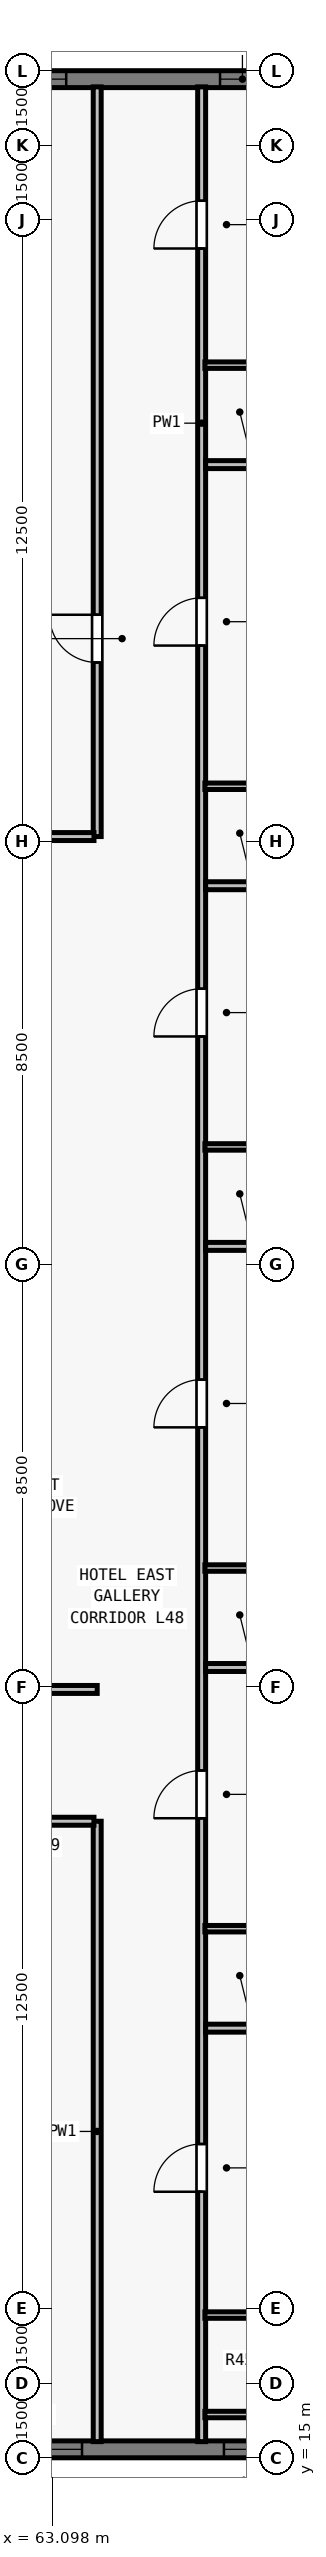
"""IFC4 building model, lengths in metres.
Left out: names, types, materials, properties, quantities, classifications, styles, units other than length and angle.
Written with IfcOpenShell. Run it as: python <this file> out.ifc"""

import sys

from ifc_helpers import new_model, si_unit, direction, frame, frame_2d, origin, place, context, subcontext, project, spatial, rectangle, extrude, element, fill, save


model = new_model("IFC4")
c1 = context("Model", 3, precision=1e-05, world=origin(), true_north=direction((0.0, 1.0)))
c2 = subcontext(c1, "Body", "Model", "MODEL_VIEW")
j1 = project(units=[si_unit("LENGTHUNIT", "METRE"), si_unit("PLANEANGLEUNIT", "RADIAN")], contexts=[c1])
p1 = place(None, origin())
s1 = spatial("IfcSite", under=j1, at=p1, CompositionType="ELEMENT")
p2 = place(p1, origin())
s2 = spatial("IfcBuilding", under=s1, at=p2, CompositionType="ELEMENT")
p3 = place(p2, frame((0.0, 0.0, 176.0)))
s3 = spatial("IfcBuildingStorey", under=s2, at=p3, CompositionType="ELEMENT", Elevation=176.0)
p4 = place(p3, frame((72.0, 15.17, 0.0), z_axis=(0.0, 0.0, 1.0), x_axis=(-1.0, 0.0, 0.0)))
e1 = element("IfcWall", 1, at=p4, inside=s3, PredefinedType="SOLIDWALL", context=c2, shape_type="SweptSolid", body=[
    extrude(rectangle(XDim=39.682, YDim=0.34, at=frame_2d((19.841, 0.0))), origin(), (0.0, 0.0, 1.0), 3.28),
])
p5 = place(p4, frame((4.102, 0.0, 0.8)))
e2 = element("IfcOpeningElement", 2, at=p5, cuts=e1, PredefinedType="OPENING", context=c2, shape_type="SweptSolid", body=[
    extrude(rectangle(XDim=1.35, YDim=1.66, at=frame_2d((0.675, 0.83))), frame((0.0, 0.18, 0.0), z_axis=(0.0, -1.0, 0.0), x_axis=(1.0, 0.0, 0.0)), (0.0, 0.0, 1.0), 0.36),
])
p6 = place(p4, frame((8.305, 0.0, 0.8)))
e3 = element("IfcOpeningElement", 3, at=p6, cuts=e1, PredefinedType="OPENING", context=c2, shape_type="SweptSolid", body=[
    extrude(rectangle(XDim=1.75, YDim=1.66, at=frame_2d((0.875, 0.83))), frame((0.0, 0.18, 0.0), z_axis=(0.0, -1.0, 0.0), x_axis=(1.0, 0.0, 0.0)), (0.0, 0.0, 1.0), 0.36),
])
p7 = place(p4, frame((12.059, 0.0, 0.8)))
e4 = element("IfcOpeningElement", 4, at=p7, cuts=e1, PredefinedType="OPENING", context=c2, shape_type="SweptSolid", body=[
    extrude(rectangle(XDim=1.35, YDim=1.66, at=frame_2d((0.675, 0.83))), frame((0.0, 0.18, 0.0), z_axis=(0.0, -1.0, 0.0), x_axis=(1.0, 0.0, 0.0)), (0.0, 0.0, 1.0), 0.36),
])
p8 = place(p4, frame((16.262, 0.0, 0.8)))
e5 = element("IfcOpeningElement", 5, at=p8, cuts=e1, PredefinedType="OPENING", context=c2, shape_type="SweptSolid", body=[
    extrude(rectangle(XDim=1.75, YDim=1.66, at=frame_2d((0.875, 0.83))), frame((0.0, 0.18, 0.0), z_axis=(0.0, -1.0, 0.0), x_axis=(1.0, 0.0, 0.0)), (0.0, 0.0, 1.0), 0.36),
])
p9 = place(p4, frame((19.166, 0.0, 0.8)))
e6 = element("IfcOpeningElement", 6, at=p9, cuts=e1, PredefinedType="OPENING", context=c2, shape_type="SweptSolid", body=[
    extrude(rectangle(XDim=1.35, YDim=1.66, at=frame_2d((0.675, 0.83))), frame((0.0, 0.18, 0.0), z_axis=(0.0, -1.0, 0.0), x_axis=(1.0, 0.0, 0.0)), (0.0, 0.0, 1.0), 0.36),
])
p10 = place(p4, frame((21.27, 0.0, 0.8)))
e7 = element("IfcOpeningElement", 7, at=p10, cuts=e1, PredefinedType="OPENING", context=c2, shape_type="SweptSolid", body=[
    extrude(rectangle(XDim=1.75, YDim=1.66, at=frame_2d((0.875, 0.83))), frame((0.0, 0.18, 0.0), z_axis=(0.0, -1.0, 0.0), x_axis=(1.0, 0.0, 0.0)), (0.0, 0.0, 1.0), 0.36),
])
p11 = place(p4, frame((26.273, 0.0, 0.8)))
e8 = element("IfcOpeningElement", 8, at=p11, cuts=e1, PredefinedType="OPENING", context=c2, shape_type="SweptSolid", body=[
    extrude(rectangle(XDim=1.35, YDim=1.66, at=frame_2d((0.675, 0.83))), frame((0.0, 0.18, 0.0), z_axis=(0.0, -1.0, 0.0), x_axis=(1.0, 0.0, 0.0)), (0.0, 0.0, 1.0), 0.36),
])
p12 = place(p4, frame((32.93, 0.0, 0.8)))
e9 = element("IfcOpeningElement", 9, at=p12, cuts=e1, PredefinedType="OPENING", context=c2, shape_type="SweptSolid", body=[
    extrude(rectangle(XDim=1.35, YDim=1.66, at=frame_2d((0.675, 0.83))), frame((0.0, 0.18, 0.0), z_axis=(0.0, -1.0, 0.0), x_axis=(1.0, 0.0, 0.0)), (0.0, 0.0, 1.0), 0.36),
])
p13 = place(p3, frame((32.0, 62.83, 0.0), z_axis=(0.0, 0.0, 1.0), x_axis=(1.0, 0.0, 0.0)))
e10 = element("IfcWall", 10, at=p13, inside=s3, PredefinedType="SOLIDWALL", context=c2, shape_type="SweptSolid", body=[
    extrude(rectangle(XDim=39.682, YDim=0.34, at=frame_2d((19.841, 0.0))), origin(), (0.0, 0.0, 1.0), 3.28),
])
p14 = place(p13, frame((4.952, 0.0, 0.8)))
e11 = element("IfcOpeningElement", 11, at=p14, cuts=e10, PredefinedType="OPENING", context=c2, shape_type="SweptSolid", body=[
    extrude(rectangle(XDim=1.35, YDim=1.66, at=frame_2d((0.675, 0.83))), frame((0.0, 0.18, 0.0), z_axis=(0.0, -1.0, 0.0), x_axis=(1.0, 0.0, 0.0)), (0.0, 0.0, 1.0), 0.36),
])
p15 = place(p13, frame((12.059, 0.0, 0.8)))
e12 = element("IfcOpeningElement", 12, at=p15, cuts=e10, PredefinedType="OPENING", context=c2, shape_type="SweptSolid", body=[
    extrude(rectangle(XDim=1.35, YDim=1.66, at=frame_2d((0.675, 0.83))), frame((0.0, 0.18, 0.0), z_axis=(0.0, -1.0, 0.0), x_axis=(1.0, 0.0, 0.0)), (0.0, 0.0, 1.0), 0.36),
])
p16 = place(p13, frame((19.166, 0.0, 0.8)))
e13 = element("IfcOpeningElement", 13, at=p16, cuts=e10, PredefinedType="OPENING", context=c2, shape_type="SweptSolid", body=[
    extrude(rectangle(XDim=1.35, YDim=1.66, at=frame_2d((0.675, 0.83))), frame((0.0, 0.18, 0.0), z_axis=(0.0, -1.0, 0.0), x_axis=(1.0, 0.0, 0.0)), (0.0, 0.0, 1.0), 0.36),
])
p17 = place(p13, frame((21.27, 0.0, 0.8)))
e14 = element("IfcOpeningElement", 14, at=p17, cuts=e10, PredefinedType="OPENING", context=c2, shape_type="SweptSolid", body=[
    extrude(rectangle(XDim=1.75, YDim=1.66, at=frame_2d((0.875, 0.83))), frame((0.0, 0.18, 0.0), z_axis=(0.0, -1.0, 0.0), x_axis=(1.0, 0.0, 0.0)), (0.0, 0.0, 1.0), 0.36),
])
p18 = place(p13, frame((26.273, 0.0, 0.8)))
e15 = element("IfcOpeningElement", 15, at=p18, cuts=e10, PredefinedType="OPENING", context=c2, shape_type="SweptSolid", body=[
    extrude(rectangle(XDim=1.35, YDim=1.66, at=frame_2d((0.675, 0.83))), frame((0.0, 0.18, 0.0), z_axis=(0.0, -1.0, 0.0), x_axis=(1.0, 0.0, 0.0)), (0.0, 0.0, 1.0), 0.36),
])
p19 = place(p13, frame((29.627, 0.0, 0.8)))
e16 = element("IfcOpeningElement", 16, at=p19, cuts=e10, PredefinedType="OPENING", context=c2, shape_type="SweptSolid", body=[
    extrude(rectangle(XDim=1.75, YDim=1.66, at=frame_2d((0.875, 0.83))), frame((0.0, 0.18, 0.0), z_axis=(0.0, -1.0, 0.0), x_axis=(1.0, 0.0, 0.0)), (0.0, 0.0, 1.0), 0.36),
])
p20 = place(p13, frame((34.47, 0.0, 0.8)))
e17 = element("IfcOpeningElement", 17, at=p20, cuts=e10, PredefinedType="OPENING", context=c2, shape_type="SweptSolid", body=[
    extrude(rectangle(XDim=0.9, YDim=1.66, at=frame_2d((0.45, 0.83))), frame((0.0, 0.18, 0.0), z_axis=(0.0, -1.0, 0.0), x_axis=(1.0, 0.0, 0.0)), (0.0, 0.0, 1.0), 0.36),
])
p21 = place(p3, frame((66.1, 15.325, 0.0), z_axis=(0.0, 0.0, 1.0), x_axis=(0.0, 1.0, 0.0)))
e18 = element("IfcWall", 18, at=p21, inside=s3, PredefinedType="PARTITIONING", context=c2, shape_type="SweptSolid", body=[
    extrude(rectangle(XDim=47.35, YDim=0.16, at=frame_2d((23.675, 0.0))), origin(), (0.0, 0.0, 1.0), 2.555),
])
p22 = place(p21, frame((5.025, 0.0, 0.0)))
e19 = element("IfcOpeningElement", 19, at=p22, cuts=e18, PredefinedType="OPENING", context=c2, shape_type="SweptSolid", body=[
    extrude(rectangle(XDim=0.96, YDim=2.15, at=frame_2d((0.48, 1.075))), frame((0.0, 0.09, 0.0), z_axis=(0.0, -1.0, 0.0), x_axis=(1.0, 0.0, 0.0)), (0.0, 0.0, 1.0), 0.18),
])
p23 = place(p21, frame((12.535, 0.0, 0.0)))
e20 = element("IfcOpeningElement", 20, at=p23, cuts=e18, PredefinedType="OPENING", context=c2, shape_type="SweptSolid", body=[
    extrude(rectangle(XDim=0.96, YDim=2.15, at=frame_2d((0.48, 1.075))), frame((0.0, 0.09, 0.0), z_axis=(0.0, -1.0, 0.0), x_axis=(1.0, 0.0, 0.0)), (0.0, 0.0, 1.0), 0.18),
])
p24 = place(p21, frame((20.395, 0.0, 0.0)))
e21 = element("IfcOpeningElement", 21, at=p24, cuts=e18, PredefinedType="OPENING", context=c2, shape_type="SweptSolid", body=[
    extrude(rectangle(XDim=0.96, YDim=2.15, at=frame_2d((0.48, 1.075))), frame((0.0, 0.09, 0.0), z_axis=(0.0, -1.0, 0.0), x_axis=(1.0, 0.0, 0.0)), (0.0, 0.0, 1.0), 0.18),
])
p25 = place(p21, frame((28.255, 0.0, 0.0)))
e22 = element("IfcOpeningElement", 22, at=p25, cuts=e18, PredefinedType="OPENING", context=c2, shape_type="SweptSolid", body=[
    extrude(rectangle(XDim=0.96, YDim=2.15, at=frame_2d((0.48, 1.075))), frame((0.0, 0.09, 0.0), z_axis=(0.0, -1.0, 0.0), x_axis=(1.0, 0.0, 0.0)), (0.0, 0.0, 1.0), 0.18),
])
p26 = place(p21, frame((36.115, 0.0, 0.0)))
e23 = element("IfcOpeningElement", 23, at=p26, cuts=e18, PredefinedType="OPENING", context=c2, shape_type="SweptSolid", body=[
    extrude(rectangle(XDim=0.96, YDim=2.15, at=frame_2d((0.48, 1.075))), frame((0.0, 0.09, 0.0), z_axis=(0.0, -1.0, 0.0), x_axis=(1.0, 0.0, 0.0)), (0.0, 0.0, 1.0), 0.18),
])
p27 = place(p21, frame((44.1, 0.0, 0.0)))
e24 = element("IfcOpeningElement", 24, at=p27, cuts=e18, PredefinedType="OPENING", context=c2, shape_type="SweptSolid", body=[
    extrude(rectangle(XDim=0.96, YDim=2.15, at=frame_2d((0.48, 1.075))), frame((0.0, 0.09, 0.0), z_axis=(0.0, -1.0, 0.0), x_axis=(1.0, 0.0, 0.0)), (0.0, 0.0, 1.0), 0.18),
])
p28 = place(p3, frame((64.0, 15.325, 0.0), z_axis=(0.0, 0.0, 1.0), x_axis=(0.0, 1.0, 0.0)))
e25 = element("IfcWall", 25, at=p28, inside=s3, PredefinedType="PARTITIONING", context=c2, shape_type="SweptSolid", body=[
    extrude(rectangle(XDim=12.475, YDim=0.16, at=frame_2d((6.238, 0.0))), origin(), (0.0, 0.0, 1.0), 2.555),
])
p29 = place(p3, frame((64.0, 47.6, 0.0), z_axis=(0.0, 0.0, 1.0), x_axis=(0.0, 1.0, 0.0)))
e26 = element("IfcWall", 26, at=p29, inside=s3, PredefinedType="PARTITIONING", context=c2, shape_type="SweptSolid", body=[
    extrude(rectangle(XDim=15.075, YDim=0.16, at=frame_2d((7.538, 0.0))), origin(), (0.0, 0.0, 1.0), 2.555),
])
p30 = place(p29, frame((3.5, 0.0, 0.0)))
e27 = element("IfcOpeningElement", 27, at=p30, cuts=e26, PredefinedType="OPENING", context=c2, shape_type="SweptSolid", body=[
    extrude(rectangle(XDim=0.96, YDim=2.12, at=frame_2d((0.48, 1.06))), frame((0.0, 0.09, 0.0), z_axis=(0.0, -1.0, 0.0), x_axis=(1.0, 0.0, 0.0)), (0.0, 0.0, 1.0), 0.18),
])
p31 = place(p3, frame((60.765, 30.45, 0.0), z_axis=(0.0, 0.0, 1.0), x_axis=(1.0, 0.0, 0.0)))
e28 = element("IfcWall", 28, at=p31, inside=s3, PredefinedType="PARTITIONING", context=c2, shape_type="SweptSolid", body=[
    extrude(rectangle(XDim=3.235, YDim=0.16, at=frame_2d((1.618, 0.0))), origin(), (0.0, 0.0, 1.0), 3.28),
])
p32 = place(p3, frame((60.765, 47.6, 0.0), z_axis=(0.0, 0.0, 1.0), x_axis=(1.0, 0.0, 0.0)))
e29 = element("IfcWall", 29, at=p32, inside=s3, PredefinedType="PARTITIONING", context=c2, shape_type="SweptSolid", body=[
    extrude(rectangle(XDim=3.17, YDim=0.16, at=frame_2d((1.585, 0.0))), origin(), (0.0, 0.0, 1.0), 3.28),
])
p33 = place(p3, frame((41.865, 27.8, 0.0), z_axis=(0.0, 0.0, 1.0), x_axis=(1.0, 0.0, 0.0)))
e30 = element("IfcWall", 30, at=p33, inside=s3, PredefinedType="PARTITIONING", context=c2, shape_type="SweptSolid", body=[
    extrude(rectangle(XDim=22.07, YDim=0.16, at=frame_2d((11.035, 0.0))), origin(), (0.0, 0.0, 1.0), 3.28),
])
p34 = place(p33, frame((4.232, 0.0, 0.0)))
e31 = element("IfcOpeningElement", 31, at=p34, cuts=e30, PredefinedType="OPENING", context=c2, shape_type="SweptSolid", body=[
    extrude(rectangle(XDim=0.96, YDim=2.15, at=frame_2d((0.48, 1.075))), frame((0.0, 0.09, 0.0), z_axis=(0.0, -1.0, 0.0), x_axis=(1.0, 0.0, 0.0)), (0.0, 0.0, 1.0), 0.18),
])
p35 = place(p33, frame((11.545, 0.0, 0.0)))
e32 = element("IfcOpeningElement", 32, at=p35, cuts=e30, PredefinedType="OPENING", context=c2, shape_type="SweptSolid", body=[
    extrude(rectangle(XDim=0.96, YDim=2.15, at=frame_2d((0.48, 1.075))), frame((0.0, 0.09, 0.0), z_axis=(0.0, -1.0, 0.0), x_axis=(1.0, 0.0, 0.0)), (0.0, 0.0, 1.0), 0.18),
])
p36 = place(p33, frame((19.168, 0.0, 0.0)))
e33 = element("IfcOpeningElement", 33, at=p36, cuts=e30, PredefinedType="OPENING", context=c2, shape_type="SweptSolid", body=[
    extrude(rectangle(XDim=0.96, YDim=2.15, at=frame_2d((0.48, 1.075))), frame((0.0, 0.09, 0.0), z_axis=(0.0, -1.0, 0.0), x_axis=(1.0, 0.0, 0.0)), (0.0, 0.0, 1.0), 0.18),
])
for number, where, z_axis, x_axis in (
    (34, (66.165, 15.87, 0.0), (0.0, 0.0, 1.0), (1.0, 0.0, 0.0)),
    (35, (66.165, 17.87, 0.0), (0.0, 0.0, 1.0), (1.0, 0.0, 0.0)),
):
    element("IfcWall", number, at=place(p3, frame(where, z_axis=z_axis, x_axis=x_axis)), inside=s3, PredefinedType="PLUMBINGWALL", context=c2, shape_type="SweptSolid", body=[
        extrude(rectangle(XDim=2.315, YDim=0.13, at=frame_2d((1.157, 0.0))), origin(), (0.0, 0.0, 1.0), 3.28),
    ])
p37 = place(p3, frame((66.18, 23.639, 0.0), z_axis=(0.0, 0.0, 1.0), x_axis=(1.0, 0.0, 0.0)))
e36 = element("IfcWall", 36, at=p37, inside=s3, PredefinedType="PARTITIONING", context=c2, shape_type="SweptSolid", body=[
    extrude(rectangle(XDim=9.495, YDim=0.16, at=frame_2d((4.748, 0.0))), origin(), (0.0, 0.0, 1.0), 2.896),
])
p38 = place(p3, frame((66.165, 25.639, 0.0), z_axis=(0.0, 0.0, 1.0), x_axis=(1.0, 0.0, 0.0)))
e37 = element("IfcWall", 37, at=p38, inside=s3, PredefinedType="PLUMBINGWALL", context=c2, shape_type="SweptSolid", body=[
    extrude(rectangle(XDim=2.315, YDim=0.13, at=frame_2d((1.157, 0.0))), origin(), (0.0, 0.0, 1.0), 2.896),
])
p39 = place(p3, frame((66.18, 30.891, 0.0), z_axis=(0.0, 0.0, 1.0), x_axis=(1.0, 0.0, 0.0)))
e38 = element("IfcWall", 38, at=p39, inside=s3, PredefinedType="PARTITIONING", context=c2, shape_type="SweptSolid", body=[
    extrude(rectangle(XDim=9.55, YDim=0.16, at=frame_2d((4.775, 0.0))), origin(), (0.0, 0.0, 1.0), 3.28),
])
p40 = place(p3, frame((66.165, 32.891, 0.0), z_axis=(0.0, 0.0, 1.0), x_axis=(1.0, 0.0, 0.0)))
e39 = element("IfcWall", 39, at=p40, inside=s3, PredefinedType="PLUMBINGWALL", context=c2, shape_type="SweptSolid", body=[
    extrude(rectangle(XDim=2.315, YDim=0.13, at=frame_2d((1.157, 0.0))), origin(), (0.0, 0.0, 1.0), 3.28),
])
p41 = place(p3, frame((66.18, 39.359, 0.0), z_axis=(0.0, 0.0, 1.0), x_axis=(1.0, 0.0, 0.0)))
e40 = element("IfcWall", 40, at=p41, inside=s3, PredefinedType="PARTITIONING", context=c2, shape_type="SweptSolid", body=[
    extrude(rectangle(XDim=9.495, YDim=0.16, at=frame_2d((4.748, 0.0))), origin(), (0.0, 0.0, 1.0), 3.28),
])
p42 = place(p3, frame((66.165, 41.359, 0.0), z_axis=(0.0, 0.0, 1.0), x_axis=(1.0, 0.0, 0.0)))
e41 = element("IfcWall", 41, at=p42, inside=s3, PredefinedType="PLUMBINGWALL", context=c2, shape_type="SweptSolid", body=[
    extrude(rectangle(XDim=2.315, YDim=0.13, at=frame_2d((1.157, 0.0))), origin(), (0.0, 0.0, 1.0), 3.28),
])
p43 = place(p3, frame((66.18, 46.611, 0.0), z_axis=(0.0, 0.0, 1.0), x_axis=(1.0, 0.0, 0.0)))
e42 = element("IfcWall", 42, at=p43, inside=s3, PredefinedType="PARTITIONING", context=c2, shape_type="SweptSolid", body=[
    extrude(rectangle(XDim=9.495, YDim=0.16, at=frame_2d((4.748, 0.0))), origin(), (0.0, 0.0, 1.0), 3.28),
])
p44 = place(p3, frame((66.165, 48.611, 0.0), z_axis=(0.0, 0.0, 1.0), x_axis=(1.0, 0.0, 0.0)))
e43 = element("IfcWall", 43, at=p44, inside=s3, PredefinedType="PLUMBINGWALL", context=c2, shape_type="SweptSolid", body=[
    extrude(rectangle(XDim=2.315, YDim=0.13, at=frame_2d((1.157, 0.0))), origin(), (0.0, 0.0, 1.0), 3.28),
])
p45 = place(p3, frame((66.18, 55.079, 0.0), z_axis=(0.0, 0.0, 1.0), x_axis=(1.0, 0.0, 0.0)))
e44 = element("IfcWall", 44, at=p45, inside=s3, PredefinedType="PARTITIONING", context=c2, shape_type="SweptSolid", body=[
    extrude(rectangle(XDim=9.495, YDim=0.16, at=frame_2d((4.748, 0.0))), origin(), (0.0, 0.0, 1.0), 2.896),
])
p46 = place(p3, frame((66.165, 57.079, 0.0), z_axis=(0.0, 0.0, 1.0), x_axis=(1.0, 0.0, 0.0)))
e45 = element("IfcWall", 45, at=p46, inside=s3, PredefinedType="PLUMBINGWALL", context=c2, shape_type="SweptSolid", body=[
    extrude(rectangle(XDim=2.315, YDim=0.13, at=frame_2d((1.157, 0.0))), origin(), (0.0, 0.0, 1.0), 3.28),
])
p47 = place(p5, origin())
e46 = element("IfcWindow", 46, at=p47, inside=s3, PartitioningType="SINGLE_PANEL", PredefinedType="WINDOW", context=c2, shape_type="SweptSolid", body=[
    extrude(rectangle(XDim=1.35, YDim=1.66, at=frame_2d((0.675, 0.83))), frame((0.0, -0.05, 0.0), z_axis=(0.0, -1.0, 0.0), x_axis=(1.0, 0.0, 0.0)), (0.0, 0.0, 1.0), 0.06),
])
fill(e2, e46)
p48 = place(p6, origin())
e47 = element("IfcWindow", 47, at=p48, inside=s3, PartitioningType="SINGLE_PANEL", PredefinedType="WINDOW", context=c2, shape_type="SweptSolid", body=[
    extrude(rectangle(XDim=1.75, YDim=1.66, at=frame_2d((0.875, 0.83))), frame((0.0, -0.05, 0.0), z_axis=(0.0, -1.0, 0.0), x_axis=(1.0, 0.0, 0.0)), (0.0, 0.0, 1.0), 0.06),
])
fill(e3, e47)
p49 = place(p19, origin())
e48 = element("IfcWindow", 48, at=p49, inside=s3, PartitioningType="SINGLE_PANEL", PredefinedType="WINDOW", context=c2, shape_type="SweptSolid", body=[
    extrude(rectangle(XDim=1.75, YDim=1.66, at=frame_2d((0.875, 0.83))), frame((0.0, -0.05, 0.0), z_axis=(0.0, -1.0, 0.0), x_axis=(1.0, 0.0, 0.0)), (0.0, 0.0, 1.0), 0.06),
])
fill(e16, e48)
p50 = place(p20, origin())
e49 = element("IfcWindow", 49, at=p50, inside=s3, PartitioningType="SINGLE_PANEL", PredefinedType="WINDOW", context=c2, shape_type="SweptSolid", body=[
    extrude(rectangle(XDim=0.9, YDim=1.66, at=frame_2d((0.45, 0.83))), frame((0.0, -0.04, 0.0), z_axis=(0.0, -1.0, 0.0), x_axis=(1.0, 0.0, 0.0)), (0.0, 0.0, 1.0), 0.06),
])
fill(e17, e49)
p51 = place(p30, origin())
e50 = element("IfcDoor", 50, at=p51, inside=s3, OperationType="SINGLE_SWING_RIGHT", PredefinedType="DOOR", context=c2, shape_type="SweptSolid", body=[
    extrude(rectangle(XDim=0.96, YDim=2.12, at=frame_2d((0.48, 1.06))), frame((0.0, 0.025, 0.0), z_axis=(0.0, -1.0, 0.0), x_axis=(1.0, 0.0, 0.0)), (0.0, 0.0, 1.0), 0.05),
])
fill(e27, e50)
p52 = place(p22, origin())
e51 = element("IfcDoor", 51, at=p52, inside=s3, OperationType="SINGLE_SWING_LEFT", PredefinedType="DOOR", context=c2, shape_type="SweptSolid", body=[
    extrude(rectangle(XDim=0.96, YDim=2.15, at=frame_2d((0.48, 1.075))), frame((0.0, 0.025, 0.0), z_axis=(0.0, -1.0, 0.0), x_axis=(1.0, 0.0, 0.0)), (0.0, 0.0, 1.0), 0.05),
])
fill(e19, e51)
p53 = place(p23, origin())
e52 = element("IfcDoor", 52, at=p53, inside=s3, OperationType="SINGLE_SWING_LEFT", PredefinedType="DOOR", context=c2, shape_type="SweptSolid", body=[
    extrude(rectangle(XDim=0.96, YDim=2.15, at=frame_2d((0.48, 1.075))), frame((0.0, 0.025, 0.0), z_axis=(0.0, -1.0, 0.0), x_axis=(1.0, 0.0, 0.0)), (0.0, 0.0, 1.0), 0.05),
])
fill(e20, e52)
p54 = place(p24, origin())
e53 = element("IfcDoor", 53, at=p54, inside=s3, OperationType="SINGLE_SWING_LEFT", PredefinedType="DOOR", context=c2, shape_type="SweptSolid", body=[
    extrude(rectangle(XDim=0.96, YDim=2.15, at=frame_2d((0.48, 1.075))), frame((0.0, 0.025, 0.0), z_axis=(0.0, -1.0, 0.0), x_axis=(1.0, 0.0, 0.0)), (0.0, 0.0, 1.0), 0.05),
])
fill(e21, e53)
p55 = place(p25, origin())
e54 = element("IfcDoor", 54, at=p55, inside=s3, OperationType="SINGLE_SWING_LEFT", PredefinedType="DOOR", context=c2, shape_type="SweptSolid", body=[
    extrude(rectangle(XDim=0.96, YDim=2.15, at=frame_2d((0.48, 1.075))), frame((0.0, 0.025, 0.0), z_axis=(0.0, -1.0, 0.0), x_axis=(1.0, 0.0, 0.0)), (0.0, 0.0, 1.0), 0.05),
])
fill(e22, e54)
p56 = place(p26, origin())
e55 = element("IfcDoor", 55, at=p56, inside=s3, OperationType="SINGLE_SWING_LEFT", PredefinedType="DOOR", context=c2, shape_type="SweptSolid", body=[
    extrude(rectangle(XDim=0.96, YDim=2.15, at=frame_2d((0.48, 1.075))), frame((0.0, 0.025, 0.0), z_axis=(0.0, -1.0, 0.0), x_axis=(1.0, 0.0, 0.0)), (0.0, 0.0, 1.0), 0.05),
])
fill(e23, e55)
p57 = place(p27, origin())
e56 = element("IfcDoor", 56, at=p57, inside=s3, OperationType="SINGLE_SWING_LEFT", PredefinedType="DOOR", context=c2, shape_type="SweptSolid", body=[
    extrude(rectangle(XDim=0.96, YDim=2.15, at=frame_2d((0.48, 1.075))), frame((0.0, 0.025, 0.0), z_axis=(0.0, -1.0, 0.0), x_axis=(1.0, 0.0, 0.0)), (0.0, 0.0, 1.0), 0.05),
])
fill(e24, e56)
save(model, sys.argv[1])
